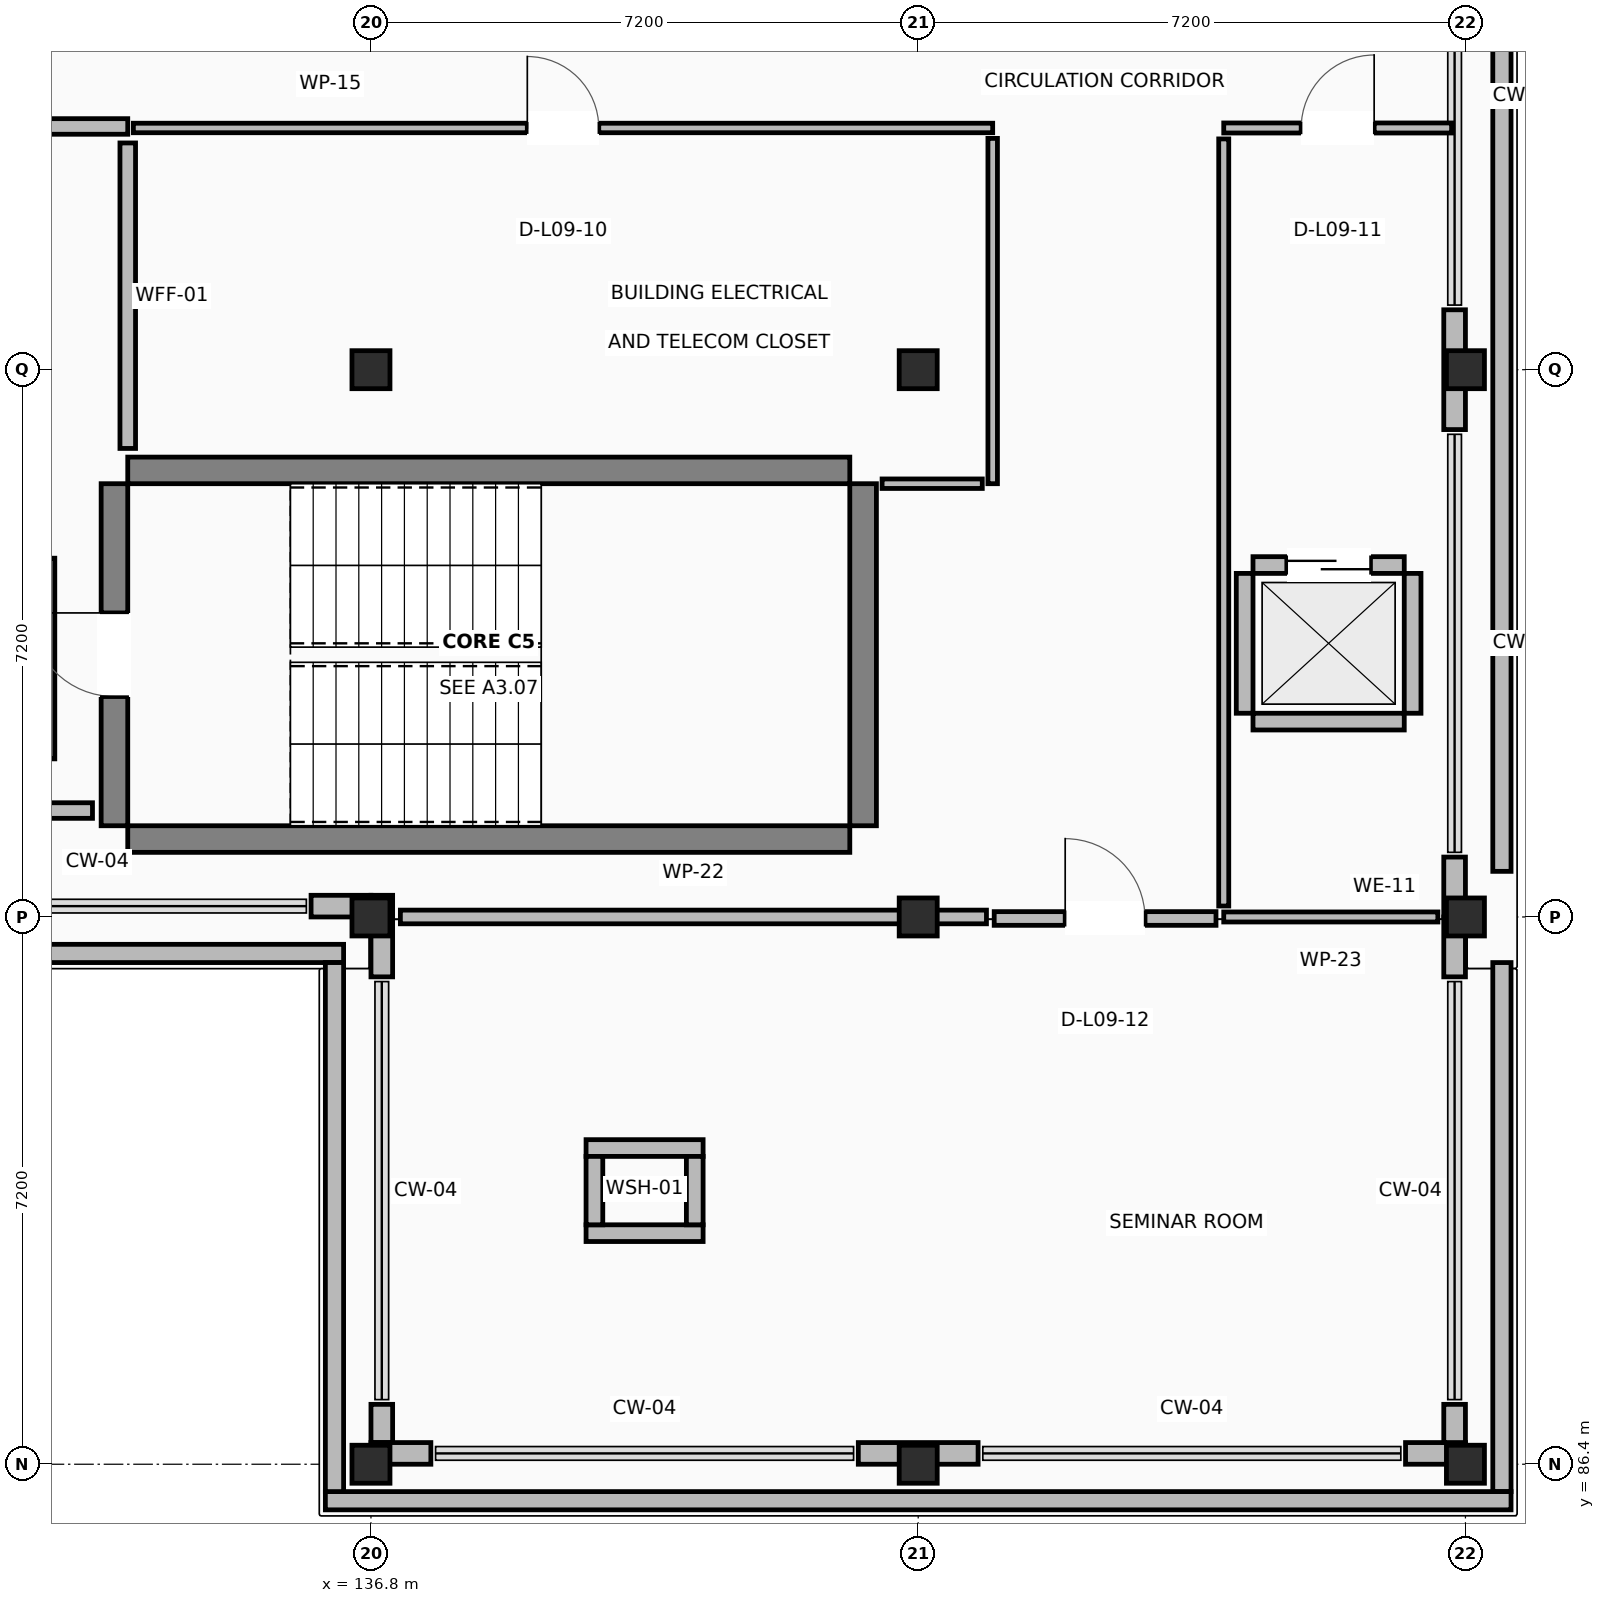
"""IFC4 building model, lengths in metres.
Left out: names, types, materials, properties, quantities, classifications, styles, units other than length and angle.
Written with IfcOpenShell. Run it as: python <this file> out.ifc"""

import sys

from ifc_helpers import new_model, si_unit, direction, frame, frame_2d, origin, origin_2d, place, context, subcontext, project, spatial, rectangle, extrude, element, fill, save


model = new_model("IFC4")
c1 = context("Model", 3, precision=1e-05, world=origin(), true_north=direction((0.0, 1.0)))
c2 = subcontext(c1, "Body", "Model", "MODEL_VIEW")
j1 = project(units=[si_unit("LENGTHUNIT", "METRE"), si_unit("PLANEANGLEUNIT", "RADIAN")], contexts=[c1])
p1 = place(None, origin())
s1 = spatial("IfcSite", under=j1, at=p1, CompositionType="ELEMENT")
p2 = place(p1, origin())
s2 = spatial("IfcBuilding", under=s1, at=p2, CompositionType="ELEMENT")
p3 = place(p2, frame((0.0, 0.0, 39.6)))
s3 = spatial("IfcBuildingStorey", under=s2, at=p3, CompositionType="ELEMENT", Elevation=39.6)
for number, where, z_axis, x_axis in (
    (1, (136.8, 86.4, 0.0), (0.0, 0.0, 1.0), (1.0, 0.0, 0.0)),
    (2, (136.8, 93.6, 0.0), (0.0, 0.0, 1.0), (1.0, 0.0, 0.0)),
    (3, (136.8, 100.8, 0.0), (0.0, 0.0, 1.0), (1.0, 0.0, 0.0)),
    (4, (144.0, 86.4, 0.0), (0.0, 0.0, 1.0), (1.0, 0.0, 0.0)),
    (5, (144.0, 93.6, 0.0), (0.0, 0.0, 1.0), (1.0, 0.0, 0.0)),
    (6, (144.0, 100.8, 0.0), (0.0, 0.0, 1.0), (1.0, 0.0, 0.0)),
    (7, (151.2, 86.4, 0.0), (0.0, 0.0, 1.0), (1.0, 0.0, 0.0)),
    (8, (151.2, 93.6, 0.0), (0.0, 0.0, 1.0), (1.0, 0.0, 0.0)),
    (9, (151.2, 100.8, 0.0), (0.0, 0.0, 1.0), (1.0, 0.0, 0.0)),
):
    element("IfcColumn", number, at=place(p3, frame(where, z_axis=z_axis, x_axis=x_axis)), inside=s3, PredefinedType="COLUMN", context=c2, shape_type="SweptSolid", body=[
        extrude(rectangle(XDim=0.5, YDim=0.5, at=origin_2d()), origin(), (0.0, 0.0, 1.0), 3.92),
    ])
for number, where, z_axis, x_axis in (
    (10, (133.6, 94.625, 0.0), (0.0, 0.0, 1.0), (1.0, 0.0, 0.0)),
    (11, (133.6, 99.475, 0.0), (0.0, 0.0, 1.0), (1.0, 0.0, 0.0)),
):
    element("IfcWall", number, at=place(p3, frame(where, z_axis=z_axis, x_axis=x_axis)), inside=s3, PredefinedType="SHEAR", context=c2, shape_type="SweptSolid", body=[
        extrude(rectangle(XDim=9.5, YDim=0.35, at=frame_2d((4.75, 0.0))), origin(), (0.0, 0.0, 1.0), 3.92),
    ])
p4 = place(p3, frame((133.425, 94.8, 0.0), z_axis=(0.0, 0.0, 1.0), x_axis=(0.0, 1.0, 0.0)))
e12 = element("IfcWall", 12, at=p4, inside=s3, PredefinedType="SHEAR", context=c2, shape_type="SweptSolid", body=[
    extrude(rectangle(XDim=4.5, YDim=0.35, at=frame_2d((2.25, 0.0))), origin(), (0.0, 0.0, 1.0), 3.92),
])
p5 = place(p4, frame((1.7, 0.0, 0.0)))
e13 = element("IfcOpeningElement", 13, at=p5, cuts=e12, PredefinedType="OPENING", context=c2, shape_type="SweptSolid", body=[
    extrude(rectangle(XDim=1.1, YDim=2.15, at=frame_2d((0.55, 1.075))), frame((0.0, 0.185, 0.0), z_axis=(0.0, -1.0, 0.0), x_axis=(1.0, 0.0, 0.0)), (0.0, 0.0, 1.0), 0.37),
])
p6 = place(p3, frame((143.275, 94.8, 0.0), z_axis=(0.0, 0.0, 1.0), x_axis=(0.0, 1.0, 0.0)))
e14 = element("IfcWall", 14, at=p6, inside=s3, PredefinedType="SHEAR", context=c2, shape_type="SweptSolid", body=[
    extrude(rectangle(XDim=4.5, YDim=0.35, at=frame_2d((2.25, 0.0))), origin(), (0.0, 0.0, 1.0), 3.92),
])
p7 = place(p3, frame((151.058, 93.6, 0.0), z_axis=(0.0, 0.0, 1.0), x_axis=(0.0, 1.0, 0.0)))
e15 = element("IfcWall", 15, at=p7, inside=s3, PredefinedType="STANDARD", context=c2, shape_type="SweptSolid", body=[
    extrude(rectangle(XDim=0.788, YDim=0.285, at=frame_2d((0.394, 0.0))), origin(), (0.0, 0.0, 1.0), 2.96),
])
p8 = place(p3, frame((151.058, 100.012, 0.0), z_axis=(0.0, 0.0, 1.0), x_axis=(0.0, 1.0, 0.0)))
e16 = element("IfcWall", 16, at=p8, inside=s3, PredefinedType="STANDARD", context=c2, shape_type="SweptSolid", body=[
    extrude(rectangle(XDim=1.576, YDim=0.285, at=frame_2d((0.788, 0.0))), origin(), (0.0, 0.0, 1.0), 2.96),
])
p9 = place(p3, frame((136.012, 93.742, 0.0), z_axis=(0.0, 0.0, 1.0), x_axis=(1.0, 0.0, 0.0)))
e17 = element("IfcWall", 17, at=p9, inside=s3, PredefinedType="STANDARD", context=c2, shape_type="SweptSolid", body=[
    extrude(rectangle(XDim=0.788, YDim=0.285, at=frame_2d((0.394, 0.0))), origin(), (0.0, 0.0, 1.0), 2.96),
])
p10 = place(p3, frame((136.942, 93.885, 0.0), z_axis=(0.0, 0.0, 1.0), x_axis=(0.0, -1.0, 0.0)))
e18 = element("IfcWall", 18, at=p10, inside=s3, PredefinedType="STANDARD", context=c2, shape_type="SweptSolid", body=[
    extrude(rectangle(XDim=1.073, YDim=0.285, at=frame_2d((0.537, 0.0))), origin(), (0.0, 0.0, 1.0), 2.96),
])
p11 = place(p3, frame((136.942, 87.188, 0.0), z_axis=(0.0, 0.0, 1.0), x_axis=(0.0, -1.0, 0.0)))
e19 = element("IfcWall", 19, at=p11, inside=s3, PredefinedType="STANDARD", context=c2, shape_type="SweptSolid", body=[
    extrude(rectangle(XDim=0.503, YDim=0.285, at=frame_2d((0.251, 0.0))), origin(), (0.0, 0.0, 1.0), 2.96),
])
p12 = place(p3, frame((136.8, 86.542, 0.0), z_axis=(0.0, 0.0, 1.0), x_axis=(1.0, 0.0, 0.0)))
e20 = element("IfcWall", 20, at=p12, inside=s3, PredefinedType="STANDARD", context=c2, shape_type="SweptSolid", body=[
    extrude(rectangle(XDim=0.788, YDim=0.285, at=frame_2d((0.394, 0.0))), origin(), (0.0, 0.0, 1.0), 2.96),
])
p13 = place(p3, frame((143.212, 86.542, 0.0), z_axis=(0.0, 0.0, 1.0), x_axis=(1.0, 0.0, 0.0)))
e21 = element("IfcWall", 21, at=p13, inside=s3, PredefinedType="STANDARD", context=c2, shape_type="SweptSolid", body=[
    extrude(rectangle(XDim=1.576, YDim=0.285, at=frame_2d((0.788, 0.0))), origin(), (0.0, 0.0, 1.0), 2.96),
])
p14 = place(p3, frame((150.412, 86.542, 0.0), z_axis=(0.0, 0.0, 1.0), x_axis=(1.0, 0.0, 0.0)))
e22 = element("IfcWall", 22, at=p14, inside=s3, PredefinedType="STANDARD", context=c2, shape_type="SweptSolid", body=[
    extrude(rectangle(XDim=0.788, YDim=0.285, at=frame_2d((0.394, 0.0))), origin(), (0.0, 0.0, 1.0), 2.96),
])
p15 = place(p3, frame((151.058, 86.685, 0.0), z_axis=(0.0, 0.0, 1.0), x_axis=(0.0, 1.0, 0.0)))
e23 = element("IfcWall", 23, at=p15, inside=s3, PredefinedType="STANDARD", context=c2, shape_type="SweptSolid", body=[
    extrude(rectangle(XDim=0.503, YDim=0.285, at=frame_2d((0.251, 0.0))), origin(), (0.0, 0.0, 1.0), 2.96),
])
p16 = place(p3, frame((151.058, 92.812, 0.0), z_axis=(0.0, 0.0, 1.0), x_axis=(0.0, 1.0, 0.0)))
e24 = element("IfcWall", 24, at=p16, inside=s3, PredefinedType="STANDARD", context=c2, shape_type="SweptSolid", body=[
    extrude(rectangle(XDim=0.788, YDim=0.285, at=frame_2d((0.394, 0.0))), origin(), (0.0, 0.0, 1.0), 2.96),
])
p17 = place(p3, frame((136.44, 93.12, 0.0), z_axis=(0.0, 0.0, 1.0), x_axis=(-1.0, 0.0, 0.0)))
e25 = element("IfcWall", 25, at=p17, inside=s3, PredefinedType="PARAPET", context=c2, shape_type="SweptSolid", body=[
    extrude(rectangle(XDim=42.28, YDim=0.24, at=frame_2d((21.14, 0.0))), origin(), (0.0, 0.0, 1.0), 1.12),
])
p18 = place(p3, frame((151.68, 115.56, 0.0), z_axis=(0.0, 0.0, 1.0), x_axis=(0.0, -1.0, 0.0)))
e26 = element("IfcWall", 26, at=p18, inside=s3, PredefinedType="PARAPET", context=c2, shape_type="SweptSolid", body=[
    extrude(rectangle(XDim=21.36, YDim=0.24, at=frame_2d((10.68, 0.0))), origin(), (0.0, 0.0, 1.0), 1.12),
])
p19 = place(p3, frame((151.68, 93.0, 0.0), z_axis=(0.0, 0.0, 1.0), x_axis=(0.0, -1.0, 0.0)))
e27 = element("IfcWall", 27, at=p19, inside=s3, PredefinedType="PARAPET", context=c2, shape_type="SweptSolid", body=[
    extrude(rectangle(XDim=6.96, YDim=0.24, at=frame_2d((3.48, 0.0))), origin(), (0.0, 0.0, 1.0), 1.12),
])
p20 = place(p3, frame((151.8, 85.92, 0.0), z_axis=(0.0, 0.0, 1.0), x_axis=(-1.0, 0.0, 0.0)))
e28 = element("IfcWall", 28, at=p20, inside=s3, PredefinedType="PARAPET", context=c2, shape_type="SweptSolid", body=[
    extrude(rectangle(XDim=15.6, YDim=0.24, at=frame_2d((7.8, 0.0))), origin(), (0.0, 0.0, 1.0), 1.12),
])
p21 = place(p3, frame((136.32, 86.04, 0.0), z_axis=(0.0, 0.0, 1.0), x_axis=(0.0, 1.0, 0.0)))
e29 = element("IfcWall", 29, at=p21, inside=s3, PredefinedType="PARAPET", context=c2, shape_type="SweptSolid", body=[
    extrude(rectangle(XDim=6.96, YDim=0.24, at=frame_2d((3.48, 0.0))), origin(), (0.0, 0.0, 1.0), 1.12),
])
p22 = place(p3, frame((132.53, 95.68, 0.0), z_axis=(0.0, 0.0, 1.0), x_axis=(0.0, 1.0, 0.0)))
e30 = element("IfcWall", 30, at=p22, inside=s3, PredefinedType="STANDARD", context=c2, shape_type="SweptSolid", body=[
    extrude(rectangle(XDim=2.64, YDim=0.22, at=frame_2d((1.32, 0.0))), origin(), (0.0, 0.0, 1.0), 2.96),
])
p23 = place(p3, frame((148.405, 96.17, 0.0), z_axis=(0.0, 0.0, 1.0), x_axis=(1.0, 0.0, 0.0)))
e31 = element("IfcWall", 31, at=p23, inside=s3, PredefinedType="STANDARD", context=c2, shape_type="SweptSolid", body=[
    extrude(rectangle(XDim=1.99, YDim=0.22, at=frame_2d((0.995, 0.0))), origin(), (0.0, 0.0, 1.0), 2.96),
])
p24 = place(p3, frame((148.405, 98.23, 0.0), z_axis=(0.0, 0.0, 1.0), x_axis=(1.0, 0.0, 0.0)))
e32 = element("IfcWall", 32, at=p24, inside=s3, PredefinedType="STANDARD", context=c2, shape_type="SweptSolid", body=[
    extrude(rectangle(XDim=1.99, YDim=0.22, at=frame_2d((0.995, 0.0))), origin(), (0.0, 0.0, 1.0), 2.96),
])
p25 = place(p24, frame((0.445, 0.0, 0.0)))
e33 = element("IfcOpeningElement", 33, at=p25, cuts=e32, PredefinedType="OPENING", context=c2, shape_type="SweptSolid", body=[
    extrude(rectangle(XDim=1.1, YDim=2.15, at=frame_2d((0.55, 1.075))), frame((0.0, 0.12, 0.0), z_axis=(0.0, -1.0, 0.0), x_axis=(1.0, 0.0, 0.0)), (0.0, 0.0, 1.0), 0.24),
])
for number, where, z_axis, x_axis in (
    (34, (148.295, 96.28, 0.0), (0.0, 0.0, 1.0), (0.0, 1.0, 0.0)),
    (35, (150.505, 96.28, 0.0), (0.0, 0.0, 1.0), (0.0, 1.0, 0.0)),
):
    element("IfcWall", number, at=place(p3, frame(where, z_axis=z_axis, x_axis=x_axis)), inside=s3, PredefinedType="STANDARD", context=c2, shape_type="SweptSolid", body=[
        extrude(rectangle(XDim=1.84, YDim=0.22, at=frame_2d((0.92, 0.0))), origin(), (0.0, 0.0, 1.0), 2.96),
    ])
for number, where, z_axis, x_axis in (
    (36, (139.63, 89.44, 0.0), (0.0, 0.0, 1.0), (1.0, 0.0, 0.0)),
    (37, (139.63, 90.56, 0.0), (0.0, 0.0, 1.0), (1.0, 0.0, 0.0)),
):
    element("IfcWall", number, at=place(p3, frame(where, z_axis=z_axis, x_axis=x_axis)), inside=s3, PredefinedType="STANDARD", context=c2, shape_type="SweptSolid", body=[
        extrude(rectangle(XDim=1.54, YDim=0.22, at=frame_2d((0.77, 0.0))), origin(), (0.0, 0.0, 1.0), 2.96),
    ])
for number, where, z_axis, x_axis in (
    (38, (139.74, 89.55, 0.0), (0.0, 0.0, 1.0), (0.0, 1.0, 0.0)),
    (39, (141.06, 89.55, 0.0), (0.0, 0.0, 1.0), (0.0, 1.0, 0.0)),
):
    element("IfcWall", number, at=place(p3, frame(where, z_axis=z_axis, x_axis=x_axis)), inside=s3, PredefinedType="STANDARD", context=c2, shape_type="SweptSolid", body=[
        extrude(rectangle(XDim=0.9, YDim=0.22, at=frame_2d((0.45, 0.0))), origin(), (0.0, 0.0, 1.0), 2.96),
    ])
p26 = place(p3, frame((129.4, 104.0, 0.0), z_axis=(0.0, 0.0, 1.0), x_axis=(1.0, 0.0, 0.0)))
e40 = element("IfcWall", 40, at=p26, inside=s3, PredefinedType="PARTITIONING", context=c2, shape_type="SweptSolid", body=[
    extrude(rectangle(XDim=4.2, YDim=0.205, at=frame_2d((2.1, 0.0))), origin(), (0.0, 0.0, 1.0), 2.96),
])
p27 = place(p26, frame((1.5, 0.0, 0.0)))
e41 = element("IfcOpeningElement", 41, at=p27, cuts=e40, PredefinedType="OPENING", context=c2, shape_type="SweptSolid", body=[
    extrude(rectangle(XDim=1.2, YDim=2.15, at=frame_2d((0.6, 1.075))), frame((0.0, 0.113, 0.0), z_axis=(0.0, -1.0, 0.0), x_axis=(1.0, 0.0, 0.0)), (0.0, 0.0, 1.0), 0.225),
])
p28 = place(p3, frame((133.6, 103.783, 0.0), z_axis=(0.0, 0.0, 1.0), x_axis=(0.0, -1.0, 0.0)))
e42 = element("IfcWall", 42, at=p28, inside=s3, PredefinedType="PARTITIONING", context=c2, shape_type="SweptSolid", body=[
    extrude(rectangle(XDim=4.019, YDim=0.205, at=frame_2d((2.01, 0.0))), origin(), (0.0, 0.0, 1.0), 2.96),
])
p29 = place(p3, frame((133.136, 95.0, 0.0), z_axis=(0.0, 0.0, 1.0), x_axis=(-1.0, 0.0, 0.0)))
e43 = element("IfcWall", 43, at=p29, inside=s3, PredefinedType="PARTITIONING", context=c2, shape_type="SweptSolid", body=[
    extrude(rectangle(XDim=3.736, YDim=0.205, at=frame_2d((1.868, 0.0))), origin(), (0.0, 0.0, 1.0), 2.96),
])
p30 = place(p3, frame((133.674, 103.98, 0.0), z_axis=(0.0, 0.0, 1.0), x_axis=(1.0, 0.0, 0.0)))
e44 = element("IfcWall", 44, at=p30, inside=s3, PredefinedType="PARTITIONING", context=c2, shape_type="SweptSolid", body=[
    extrude(rectangle(XDim=11.306, YDim=0.125, at=frame_2d((5.653, 0.0))), origin(), (0.0, 0.0, 1.0), 2.96),
])
p31 = place(p30, frame((5.183, 0.0, 0.0)))
e45 = element("IfcOpeningElement", 45, at=p31, cuts=e44, PredefinedType="OPENING", context=c2, shape_type="SweptSolid", body=[
    extrude(rectangle(XDim=0.94, YDim=2.1, at=frame_2d((0.47, 1.05))), frame((0.0, 0.073, 0.0), z_axis=(0.0, -1.0, 0.0), x_axis=(1.0, 0.0, 0.0)), (0.0, 0.0, 1.0), 0.145),
])
p32 = place(p3, frame((144.98, 103.843, 0.0), z_axis=(0.0, 0.0, 1.0), x_axis=(0.0, -1.0, 0.0)))
e46 = element("IfcWall", 46, at=p32, inside=s3, PredefinedType="PARTITIONING", context=c2, shape_type="SweptSolid", body=[
    extrude(rectangle(XDim=4.543, YDim=0.125, at=frame_2d((2.271, 0.0))), origin(), (0.0, 0.0, 1.0), 2.96),
])
p33 = place(p3, frame((144.843, 99.3, 0.0), z_axis=(0.0, 0.0, 1.0), x_axis=(-1.0, 0.0, 0.0)))
e47 = element("IfcWall", 47, at=p33, inside=s3, PredefinedType="PARTITIONING", context=c2, shape_type="SweptSolid", body=[
    extrude(rectangle(XDim=1.318, YDim=0.125, at=frame_2d((0.659, 0.0))), origin(), (0.0, 0.0, 1.0), 2.96),
])
p34 = place(p3, frame((148.02, 103.98, 0.0), z_axis=(0.0, 0.0, 1.0), x_axis=(1.0, 0.0, 0.0)))
e48 = element("IfcWall", 48, at=p34, inside=s3, PredefinedType="PARTITIONING", context=c2, shape_type="SweptSolid", body=[
    extrude(rectangle(XDim=2.998, YDim=0.132, at=frame_2d((1.499, 0.0))), origin(), (0.0, 0.0, 1.0), 2.96),
])
p35 = place(p34, frame((1.019, 0.0, 0.0)))
e49 = element("IfcOpeningElement", 49, at=p35, cuts=e48, PredefinedType="OPENING", context=c2, shape_type="SweptSolid", body=[
    extrude(rectangle(XDim=0.96, YDim=2.1, at=frame_2d((0.48, 1.05))), frame((0.0, 0.076, 0.0), z_axis=(0.0, -1.0, 0.0), x_axis=(1.0, 0.0, 0.0)), (0.0, 0.0, 1.0), 0.152),
])
p36 = place(p3, frame((150.837, 93.6, 0.0), z_axis=(0.0, 0.0, 1.0), x_axis=(-1.0, 0.0, 0.0)))
e50 = element("IfcWall", 50, at=p36, inside=s3, PredefinedType="PARTITIONING", context=c2, shape_type="SweptSolid", body=[
    extrude(rectangle(XDim=2.817, YDim=0.132, at=frame_2d((1.408, 0.0))), origin(), (0.0, 0.0, 1.0), 2.96),
])
p37 = place(p3, frame((148.02, 93.744, 0.0), z_axis=(0.0, 0.0, 1.0), x_axis=(0.0, 1.0, 0.0)))
e51 = element("IfcWall", 51, at=p37, inside=s3, PredefinedType="PARTITIONING", context=c2, shape_type="SweptSolid", body=[
    extrude(rectangle(XDim=10.092, YDim=0.132, at=frame_2d((5.046, 0.0))), origin(), (0.0, 0.0, 1.0), 2.96),
])
p38 = place(p3, frame((145.0, 93.58, 0.0), z_axis=(0.0, 0.0, 1.0), x_axis=(1.0, 0.0, 0.0)))
e52 = element("IfcWall", 52, at=p38, inside=s3, PredefinedType="PARTITIONING", context=c2, shape_type="SweptSolid", body=[
    extrude(rectangle(XDim=2.918, YDim=0.18, at=frame_2d((1.459, 0.0))), origin(), (0.0, 0.0, 1.0), 2.96),
])
p39 = place(p38, frame((0.934, 0.0, 0.0)))
e53 = element("IfcOpeningElement", 53, at=p39, cuts=e52, PredefinedType="OPENING", context=c2, shape_type="SweptSolid", body=[
    extrude(rectangle(XDim=1.05, YDim=2.15, at=frame_2d((0.525, 1.075))), frame((0.0, 0.1, 0.0), z_axis=(0.0, -1.0, 0.0), x_axis=(1.0, 0.0, 0.0)), (0.0, 0.0, 1.0), 0.2),
])
p40 = place(p3, frame((137.187, 93.6, 0.0), z_axis=(0.0, 0.0, 1.0), x_axis=(1.0, 0.0, 0.0)))
e54 = element("IfcWall", 54, at=p40, inside=s3, PredefinedType="PARTITIONING", context=c2, shape_type="SweptSolid", body=[
    extrude(rectangle(XDim=7.711, YDim=0.18, at=frame_2d((3.855, 0.0))), origin(), (0.0, 0.0, 1.0), 2.96),
])
p41 = place(p5, origin())
e55 = element("IfcDoor", 55, at=p41, inside=s3, OperationType="SINGLE_SWING_RIGHT", PredefinedType="DOOR", context=c2, shape_type="SweptSolid", body=[
    extrude(rectangle(XDim=1.1, YDim=2.15, at=frame_2d((0.55, 1.075))), frame((0.0, 0.025, 0.0), z_axis=(0.0, -1.0, 0.0), x_axis=(1.0, 0.0, 0.0)), (0.0, 0.0, 1.0), 0.05),
])
fill(e13, e55)
p42 = place(p25, origin())
e56 = element("IfcDoor", 56, at=p42, inside=s3, OperationType="SLIDING_TO_RIGHT", PredefinedType="DOOR", context=c2, shape_type="SweptSolid", body=[
    extrude(rectangle(XDim=1.1, YDim=2.15, at=frame_2d((0.55, 1.075))), frame((0.0, 0.025, 0.0), z_axis=(0.0, -1.0, 0.0), x_axis=(1.0, 0.0, 0.0)), (0.0, 0.0, 1.0), 0.05),
])
fill(e33, e56)
p43 = place(p31, origin())
e57 = element("IfcDoor", 57, at=p43, inside=s3, OperationType="SINGLE_SWING_LEFT", PredefinedType="DOOR", context=c2, shape_type="SweptSolid", body=[
    extrude(rectangle(XDim=0.94, YDim=2.1, at=frame_2d((0.47, 1.05))), frame((0.0, 0.025, 0.0), z_axis=(0.0, -1.0, 0.0), x_axis=(1.0, 0.0, 0.0)), (0.0, 0.0, 1.0), 0.05),
])
fill(e45, e57)
p44 = place(p35, origin())
e58 = element("IfcDoor", 58, at=p44, inside=s3, OperationType="SINGLE_SWING_RIGHT", PredefinedType="DOOR", context=c2, shape_type="SweptSolid", body=[
    extrude(rectangle(XDim=0.96, YDim=2.1, at=frame_2d((0.48, 1.05))), frame((0.0, 0.025, 0.0), z_axis=(0.0, -1.0, 0.0), x_axis=(1.0, 0.0, 0.0)), (0.0, 0.0, 1.0), 0.05),
])
fill(e49, e58)
p45 = place(p39, origin())
e59 = element("IfcDoor", 59, at=p45, inside=s3, OperationType="SINGLE_SWING_LEFT", PredefinedType="DOOR", context=c2, shape_type="SweptSolid", body=[
    extrude(rectangle(XDim=1.05, YDim=2.15, at=frame_2d((0.525, 1.075))), frame((0.0, 0.025, 0.0), z_axis=(0.0, -1.0, 0.0), x_axis=(1.0, 0.0, 0.0)), (0.0, 0.0, 1.0), 0.05),
])
fill(e53, e59)
save(model, sys.argv[1])
